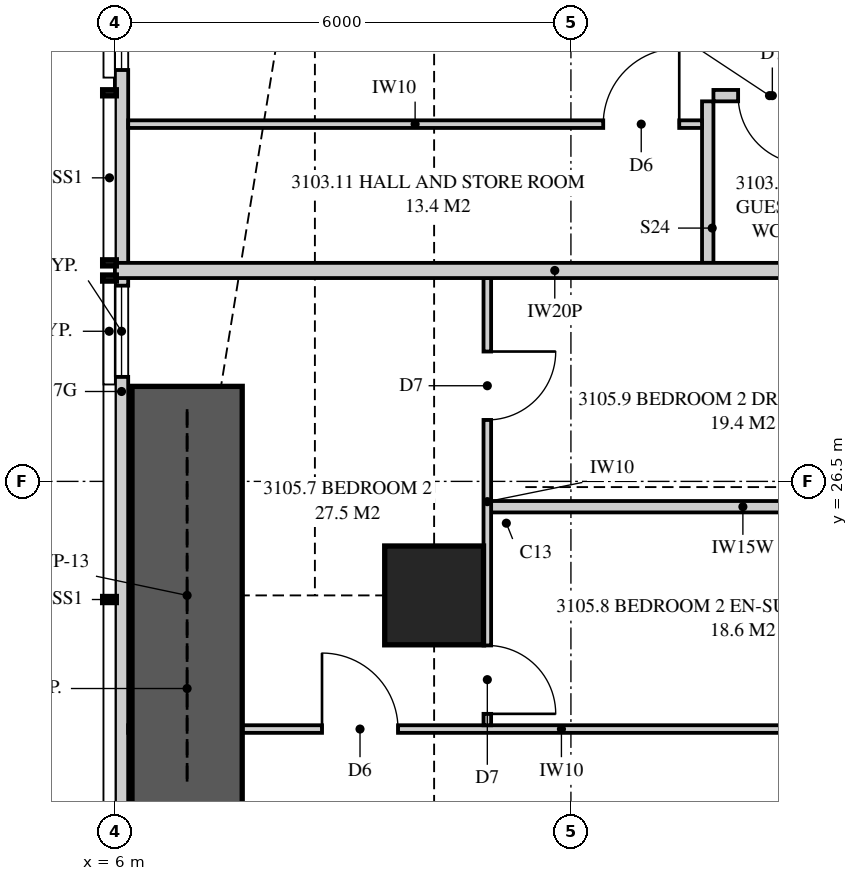
"""IFC4 building model, lengths in metres.
Left out: names, types, materials, properties, quantities, classifications, styles, units other than length and angle.
Written with IfcOpenShell. Run it as: python <this file> out.ifc"""

import sys

from ifc_helpers import new_model, si_unit, direction, frame, frame_2d, origin, origin_2d, place, context, subcontext, project, spatial, polyline, rectangle, outline, extrude, element, fill, save


model = new_model("IFC4")
c1 = context("Model", 3, precision=1e-05, world=origin(), true_north=direction((0.0, 1.0)))
c2 = subcontext(c1, "Body", "Model", "MODEL_VIEW")
j1 = project(units=[si_unit("LENGTHUNIT", "METRE"), si_unit("PLANEANGLEUNIT", "RADIAN")], contexts=[c1])
p1 = place(None, origin())
s1 = spatial("IfcSite", under=j1, at=p1, CompositionType="ELEMENT")
p2 = place(p1, origin())
s2 = spatial("IfcBuilding", under=s1, at=p2, CompositionType="ELEMENT")
p3 = place(p2, frame((0.0, 0.0, 114.9)))
s3 = spatial("IfcBuildingStorey", under=s2, at=p3, CompositionType="ELEMENT", Elevation=114.9)
p4 = place(p3, frame((10.2, 25.0, 0.0), z_axis=(0.0, 0.0, 1.0), x_axis=(1.0, 0.0, 0.0)))
e1 = element("IfcColumn", 1, at=p4, inside=s3, PredefinedType="COLUMN", context=c2, shape_type="SweptSolid", body=[
    extrude(rectangle(XDim=1.3, YDim=1.3, at=origin_2d()), origin(), (0.0, 0.0, 1.0), 3.35),
])
p5 = place(p3, frame((6.087, 34.949, 0.0), z_axis=(0.0, 0.0, 1.0), x_axis=(0.0, -1.0, 0.0)))
e2 = element("IfcWall", 2, at=p5, inside=s3, PredefinedType="SOLIDWALL", context=c2, shape_type="SweptSolid", body=[
    extrude(outline(polyline([(0.0, 0.0), (14.532, 0.0), (14.532, 2.15), (9.949, 2.15), (9.949, 3.11), (9.823, 3.11), (9.823, 2.15), (9.73, 2.15), (9.73, 3.11), (0.0, 3.11), (0.0, 0.0)])), frame((0.0, 0.087, 0.0), z_axis=(0.0, -1.0, 0.0), x_axis=(1.0, 0.0, 0.0)), (0.0, 0.0, 1.0), 0.175),
])
p6 = place(p5, frame((0.636, 0.0, 0.4)))
e3 = element("IfcOpeningElement", 3, at=p6, cuts=e2, PredefinedType="OPENING", context=c2, shape_type="SweptSolid", body=[
    extrude(rectangle(XDim=2.4, YDim=1.7, at=frame_2d((1.2, 0.85))), frame((0.0, 0.097, 0.0), z_axis=(0.0, -1.0, 0.0), x_axis=(1.0, 0.0, 0.0)), (0.0, 0.0, 1.0), 0.195),
])
p7 = place(p5, frame((5.874, 0.0, 0.4)))
e4 = element("IfcOpeningElement", 4, at=p7, cuts=e2, PredefinedType="OPENING", context=c2, shape_type="SweptSolid", body=[
    extrude(rectangle(XDim=1.2, YDim=1.7, at=frame_2d((0.6, 0.85))), frame((0.0, 0.097, 0.0), z_axis=(0.0, -1.0, 0.0), x_axis=(1.0, 0.0, 0.0)), (0.0, 0.0, 1.0), 0.195),
])
p8 = place(p3, frame((13.875, 31.575, 0.0), z_axis=(0.0, 0.0, 1.0), x_axis=(1.0, 0.0, 0.0)))
e5 = element("IfcWall", 5, at=p8, inside=s3, PredefinedType="PLUMBINGWALL", context=c2, shape_type="SweptSolid", body=[
    extrude(rectangle(XDim=1.475, YDim=0.15, at=frame_2d((0.738, 0.0))), origin(), (0.0, 0.0, 1.0), 3.11),
])
p9 = place(p8, frame((0.325, 0.0, 0.0)))
e6 = element("IfcOpeningElement", 6, at=p9, cuts=e5, PredefinedType="OPENING", context=c2, shape_type="SweptSolid", body=[
    extrude(rectangle(XDim=0.9, YDim=2.1, at=frame_2d((0.45, 1.05))), frame((0.0, 0.085, 0.0), z_axis=(0.0, -1.0, 0.0), x_axis=(1.0, 0.0, 0.0)), (0.0, 0.0, 1.0), 0.17),
])
p10 = place(p3, frame((13.8, 31.5, 0.0), z_axis=(0.0, 0.0, 1.0), x_axis=(0.0, -1.0, 0.0)))
e7 = element("IfcWall", 7, at=p10, inside=s3, PredefinedType="PLUMBINGWALL", context=c2, shape_type="SweptSolid", body=[
    extrude(rectangle(XDim=2.125, YDim=0.15, at=frame_2d((1.062, 0.0))), origin(), (0.0, 0.0, 1.0), 3.11),
])
p11 = place(p3, frame((6.175, 31.2, 0.0), z_axis=(0.0, 0.0, 1.0), x_axis=(1.0, 0.0, 0.0)))
e8 = element("IfcWall", 8, at=p11, inside=s3, PredefinedType="PARTITIONING", context=c2, shape_type="SweptSolid", body=[
    extrude(outline(polyline([(0.0, 0.0), (7.55, 0.0), (7.55, 3.11), (5.285, 3.11), (5.285, 2.51), (2.765, 2.51), (2.765, 3.11), (2.744, 3.11), (2.744, 2.541), (2.652, 2.541), (2.652, 2.15), (0.909, 2.15), (0.909, 3.11), (0.0, 3.11), (0.0, 0.0)])), frame((0.0, 0.05, 0.0), z_axis=(0.0, -1.0, 0.0), x_axis=(1.0, 0.0, 0.0)), (0.0, 0.0, 1.0), 0.1),
])
p12 = place(p11, frame((6.25, 0.0, 0.0)))
e9 = element("IfcOpeningElement", 9, at=p12, cuts=e8, PredefinedType="OPENING", context=c2, shape_type="SweptSolid", body=[
    extrude(rectangle(XDim=1.0, YDim=2.1, at=frame_2d((0.5, 1.05))), frame((0.0, 0.06, 0.0), z_axis=(0.0, -1.0, 0.0), x_axis=(1.0, 0.0, 0.0)), (0.0, 0.0, 1.0), 0.12),
])
p13 = place(p3, frame((6.0, 29.275, 0.0), z_axis=(0.0, 0.0, 1.0), x_axis=(1.0, 0.0, 0.0)))
e10 = element("IfcWall", 10, at=p13, inside=s3, PredefinedType="PARTITIONING", context=c2, shape_type="SweptSolid", body=[
    extrude(outline(polyline([(0.0, 0.0), (11.575, 0.0), (11.575, 3.11), (11.212, 3.11), (11.212, 2.541), (10.538, 2.541), (10.538, 3.11), (5.51, 3.11), (5.51, 2.51), (2.969, 2.51), (2.969, 2.541), (2.565, 2.541), (2.565, 2.15), (0.721, 2.15), (0.721, 3.11), (0.0, 3.11), (0.0, 0.0)])), frame((0.0, 0.1, 0.0), z_axis=(0.0, -1.0, 0.0), x_axis=(1.0, 0.0, 0.0)), (0.0, 0.0, 1.0), 0.2),
])
p14 = place(p3, frame((6.175, 23.242, 0.0), z_axis=(0.0, 0.0, 1.0), x_axis=(1.0, 0.0, 0.0)))
e11 = element("IfcWall", 11, at=p14, inside=s3, PredefinedType="PARTITIONING", context=c2, shape_type="SweptSolid", body=[
    extrude(outline(polyline([(0.529, 2.15), (0.0, 2.15), (0.0, 0.0), (0.529, 0.0), (0.529, 0.268), (1.021, 0.268), (1.021, 0.0), (11.4, 0.0), (11.4, 3.11), (5.285, 3.11), (5.285, 2.51), (2.765, 2.51), (2.765, 3.11), (1.635, 3.11), (1.635, 2.15), (1.021, 2.15), (1.021, 1.882), (0.529, 1.882), (0.529, 2.15)])), frame((0.0, 0.05, 0.0), z_axis=(0.0, -1.0, 0.0), x_axis=(1.0, 0.0, 0.0)), (0.0, 0.0, 1.0), 0.1),
])
p15 = place(p14, frame((2.55, 0.0, 0.0)))
e12 = element("IfcOpeningElement", 12, at=p15, cuts=e11, PredefinedType="OPENING", context=c2, shape_type="SweptSolid", body=[
    extrude(rectangle(XDim=1.0, YDim=2.1, at=frame_2d((0.5, 1.05))), frame((0.0, 0.06, 0.0), z_axis=(0.0, -1.0, 0.0), x_axis=(1.0, 0.0, 0.0)), (0.0, 0.0, 1.0), 0.12),
])
p16 = place(p3, frame((10.9, 23.292, 0.0), z_axis=(0.0, 0.0, 1.0), x_axis=(0.0, 1.0, 0.0)))
e13 = element("IfcWall", 13, at=p16, inside=s3, PredefinedType="PARTITIONING", context=c2, shape_type="SweptSolid", body=[
    extrude(outline(polyline([(0.0, 0.0), (5.883, 0.0), (5.883, 3.11), (5.883, 2.51), (1.768, 2.51), (0.0, 2.51), (0.0, 3.11), (0.0, 0.0)])), frame((0.0, 0.05, 0.0), z_axis=(0.0, -1.0, 0.0), x_axis=(1.0, 0.0, 0.0)), (0.0, 0.0, 1.0), 0.1),
])
p17 = place(p16, frame((0.15, 0.0, 0.0)))
e14 = element("IfcOpeningElement", 14, at=p17, cuts=e13, PredefinedType="OPENING", context=c2, shape_type="SweptSolid", body=[
    extrude(rectangle(XDim=0.9, YDim=2.1, at=frame_2d((0.45, 1.05))), frame((0.0, 0.06, 0.0), z_axis=(0.0, -1.0, 0.0), x_axis=(1.0, 0.0, 0.0)), (0.0, 0.0, 1.0), 0.12),
])
p18 = place(p16, frame((4.017, 0.0, 0.0)))
e15 = element("IfcOpeningElement", 15, at=p18, cuts=e13, PredefinedType="OPENING", context=c2, shape_type="SweptSolid", body=[
    extrude(rectangle(XDim=0.9, YDim=2.1, at=frame_2d((0.45, 1.05))), frame((0.0, 0.06, 0.0), z_axis=(0.0, -1.0, 0.0), x_axis=(1.0, 0.0, 0.0)), (0.0, 0.0, 1.0), 0.12),
])
p19 = place(p3, frame((10.95, 26.167, 0.0), z_axis=(0.0, 0.0, 1.0), x_axis=(1.0, 0.0, 0.0)))
e16 = element("IfcWall", 16, at=p19, inside=s3, PredefinedType="PLUMBINGWALL", context=c2, shape_type="SweptSolid", body=[
    extrude(outline(polyline([(0.0, 0.0), (6.625, 0.0), (6.625, 3.11), (6.625, 2.541), (0.535, 2.541), (0.535, 2.51), (0.0, 2.51), (0.0, 3.11), (0.0, 0.0)])), frame((0.0, 0.075, 0.0), z_axis=(0.0, -1.0, 0.0), x_axis=(1.0, 0.0, 0.0)), (0.0, 0.0, 1.0), 0.15),
])
p20 = place(p3, frame((6.95, 22.25, 0.0), z_axis=(0.0, 0.0, 1.0), x_axis=(0.0, 1.0, 0.0)))
e17 = element("IfcWall", 17, at=p20, inside=s3, PredefinedType="SHEAR", context=c2, shape_type="SweptSolid", body=[
    extrude(rectangle(XDim=5.5, YDim=1.45, at=frame_2d((2.75, 0.0))), origin(), (0.0, 0.0, 1.0), 3.35),
])
p21 = place(p6, origin())
e18 = element("IfcWindow", 18, at=p21, inside=s3, PartitioningType="SINGLE_PANEL", PredefinedType="WINDOW", context=c2, shape_type="SweptSolid", body=[
    extrude(rectangle(XDim=2.4, YDim=1.7, at=frame_2d((1.2, 0.85))), frame((0.0, 0.03, 0.0), z_axis=(0.0, -1.0, 0.0), x_axis=(1.0, 0.0, 0.0)), (0.0, 0.0, 1.0), 0.06),
])
fill(e3, e18)
p22 = place(p7, origin())
e19 = element("IfcWindow", 19, at=p22, inside=s3, PartitioningType="SINGLE_PANEL", PredefinedType="WINDOW", context=c2, shape_type="SweptSolid", body=[
    extrude(rectangle(XDim=1.2, YDim=1.7, at=frame_2d((0.6, 0.85))), frame((0.0, 0.03, 0.0), z_axis=(0.0, -1.0, 0.0), x_axis=(1.0, 0.0, 0.0)), (0.0, 0.0, 1.0), 0.06),
])
fill(e4, e19)
p23 = place(p9, frame((0.9, 0.0, 0.0), z_axis=(0.0, 0.0, 1.0), x_axis=(-1.0, 0.0, 0.0)))
e20 = element("IfcDoor", 20, at=p23, inside=s3, OperationType="SINGLE_SWING_LEFT", PredefinedType="DOOR", context=c2, shape_type="SweptSolid", body=[
    extrude(rectangle(XDim=0.9, YDim=2.1, at=frame_2d((0.45, 1.05))), frame((0.0, 0.025, 0.0), z_axis=(0.0, -1.0, 0.0), x_axis=(1.0, 0.0, 0.0)), (0.0, 0.0, 1.0), 0.05),
])
fill(e6, e20)
p24 = place(p12, origin())
e21 = element("IfcDoor", 21, at=p24, inside=s3, OperationType="SINGLE_SWING_RIGHT", PredefinedType="DOOR", context=c2, shape_type="SweptSolid", body=[
    extrude(rectangle(XDim=1.0, YDim=2.1, at=frame_2d((0.5, 1.05))), frame((0.0, 0.025, 0.0), z_axis=(0.0, -1.0, 0.0), x_axis=(1.0, 0.0, 0.0)), (0.0, 0.0, 1.0), 0.05),
])
fill(e9, e21)
p25 = place(p15, origin())
e22 = element("IfcDoor", 22, at=p25, inside=s3, OperationType="SINGLE_SWING_LEFT", PredefinedType="DOOR", context=c2, shape_type="SweptSolid", body=[
    extrude(rectangle(XDim=1.0, YDim=2.1, at=frame_2d((0.5, 1.05))), frame((0.0, 0.025, 0.0), z_axis=(0.0, -1.0, 0.0), x_axis=(1.0, 0.0, 0.0)), (0.0, 0.0, 1.0), 0.05),
])
fill(e12, e22)
p26 = place(p17, frame((0.9, 0.0, 0.0), z_axis=(0.0, 0.0, 1.0), x_axis=(-1.0, 0.0, 0.0)))
e23 = element("IfcDoor", 23, at=p26, inside=s3, OperationType="SINGLE_SWING_RIGHT", PredefinedType="DOOR", context=c2, shape_type="SweptSolid", body=[
    extrude(rectangle(XDim=0.9, YDim=2.1, at=frame_2d((0.45, 1.05))), frame((0.0, 0.025, 0.0), z_axis=(0.0, -1.0, 0.0), x_axis=(1.0, 0.0, 0.0)), (0.0, 0.0, 1.0), 0.05),
])
fill(e14, e23)
p27 = place(p18, frame((0.9, 0.0, 0.0), z_axis=(0.0, 0.0, 1.0), x_axis=(-1.0, 0.0, 0.0)))
e24 = element("IfcDoor", 24, at=p27, inside=s3, OperationType="SINGLE_SWING_LEFT", PredefinedType="DOOR", context=c2, shape_type="SweptSolid", body=[
    extrude(rectangle(XDim=0.9, YDim=2.1, at=frame_2d((0.45, 1.05))), frame((0.0, 0.025, 0.0), z_axis=(0.0, -1.0, 0.0), x_axis=(1.0, 0.0, 0.0)), (0.0, 0.0, 1.0), 0.05),
])
fill(e15, e24)
save(model, sys.argv[1])
